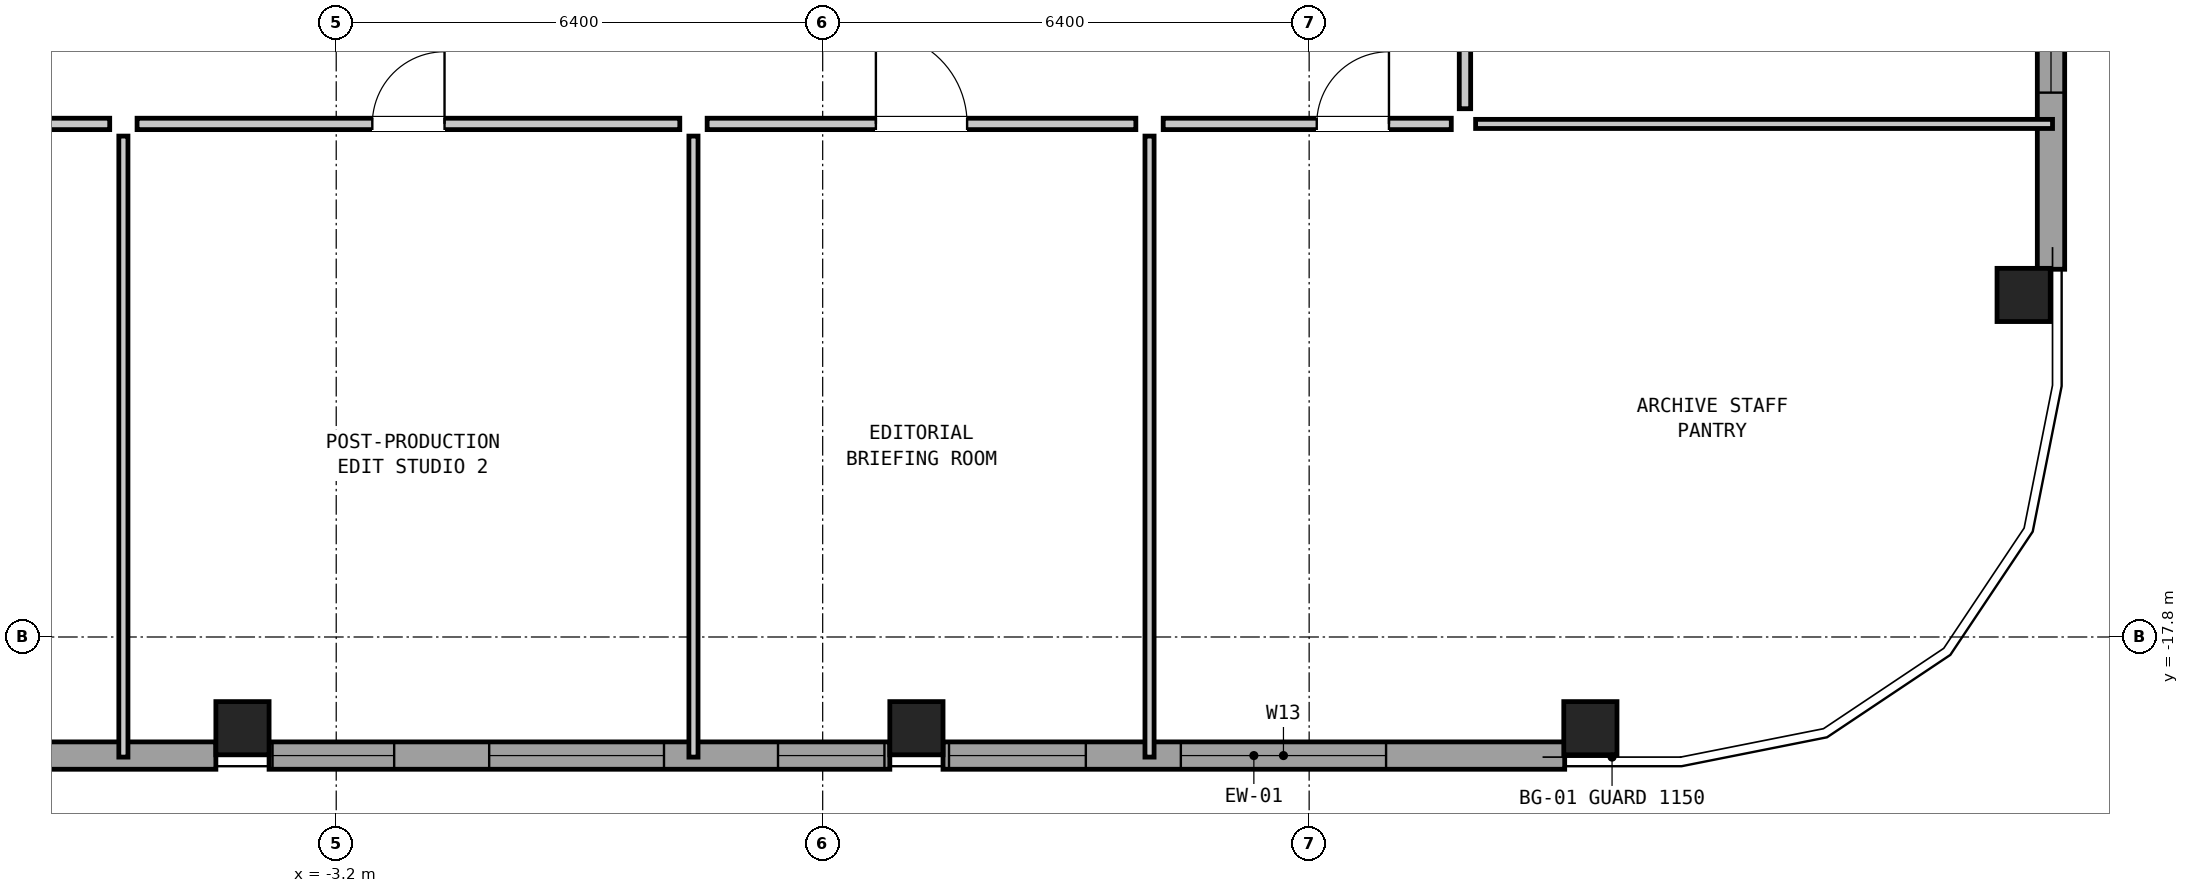
"""IFC4 building model, lengths in metres.
Left out: names, types, materials, properties, quantities, classifications, styles, units other than length and angle.
Written with IfcOpenShell. Run it as: python <this file> out.ifc"""

import sys

from ifc_helpers import new_model, si_unit, direction, frame, frame_2d, origin, origin_2d, place, context, subcontext, project, spatial, rectangle, hollow_rectangle, extrude, element, fill, save


model = new_model("IFC4")
c1 = context("Model", 3, precision=1e-05, world=origin(), true_north=direction((0.0, 1.0)))
c2 = subcontext(c1, "Body", "Model", "MODEL_VIEW")
j1 = project(units=[si_unit("LENGTHUNIT", "METRE"), si_unit("PLANEANGLEUNIT", "RADIAN")], contexts=[c1])
p1 = place(None, origin())
s1 = spatial("IfcSite", under=j1, at=p1, CompositionType="ELEMENT")
p2 = place(p1, origin())
s2 = spatial("IfcBuilding", under=s1, at=p2, CompositionType="ELEMENT")
p3 = place(p2, frame((0.0, 0.0, 220.85)))
s3 = spatial("IfcBuildingStorey", under=s2, at=p3, CompositionType="ELEMENT", Elevation=220.85)
for number, where, z_axis, x_axis in (
    (1, (-4.433, -19.0, 0.0), (0.0, 0.0, 1.0), (1.0, 0.0, 0.0)),
    (2, (4.433, -19.0, 0.0), (0.0, 0.0, 1.0), (1.0, 0.0, 0.0)),
    (3, (13.3, -19.0, 0.0), (0.0, 0.0, 1.0), (1.0, 0.0, 0.0)),
    (4, (19.0, -13.3, 0.0), (0.0, 0.0, 1.0), (0.0, 1.0, 0.0)),
):
    element("IfcColumn", number, at=place(p3, frame(where, z_axis=z_axis, x_axis=x_axis)), inside=s3, PredefinedType="COLUMN", context=c2, shape_type="SweptSolid", body=[
        extrude(hollow_rectangle(XDim=0.7, YDim=0.7, WallThickness=0.045, at=origin_2d()), origin(), (0.0, 0.0, 1.0), 3.05),
    ])
p4 = place(p3, frame((12.962, -19.36, 0.0), z_axis=(0.0, 0.0, 1.0), x_axis=(-1.0, 0.0, 0.0)))
e5 = element("IfcWall", 5, at=p4, inside=s3, PredefinedType="SOLIDWALL", context=c2, shape_type="SweptSolid", body=[
    extrude(rectangle(XDim=8.179, YDim=0.36, at=frame_2d((4.089, 0.0))), origin(), (0.0, 0.0, 1.0), 2.374),
])
p5 = place(p4, frame((2.35, 0.0, 0.2)))
e6 = element("IfcOpeningElement", 6, at=p5, cuts=e5, PredefinedType="OPENING", context=c2, shape_type="SweptSolid", body=[
    extrude(rectangle(XDim=2.7, YDim=1.1, at=frame_2d((1.35, 0.55))), frame((0.0, 0.192, 0.0), z_axis=(0.0, -1.0, 0.0), x_axis=(1.0, 0.0, 0.0)), (0.0, 0.0, 1.0), 0.384),
])
p6 = place(p4, frame((6.3, 0.0, 1.25)))
e7 = element("IfcOpeningElement", 7, at=p6, cuts=e5, PredefinedType="OPENING", context=c2, shape_type="SweptSolid", body=[
    extrude(rectangle(XDim=1.8, YDim=0.95, at=frame_2d((0.9, 0.475))), frame((0.0, 0.192, 0.0), z_axis=(0.0, -1.0, 0.0), x_axis=(1.0, 0.0, 0.0)), (0.0, 0.0, 1.0), 0.384),
])
p7 = place(p3, frame((4.083, -19.36, 0.0), z_axis=(0.0, 0.0, 1.0), x_axis=(-1.0, 0.0, 0.0)))
e8 = element("IfcWall", 8, at=p7, inside=s3, PredefinedType="SOLIDWALL", context=c2, shape_type="SweptSolid", body=[
    extrude(rectangle(XDim=8.167, YDim=0.36, at=frame_2d((4.083, 0.0))), origin(), (0.0, 0.0, 1.0), 2.374),
])
p8 = place(p7, frame((0.071, 0.0, 1.25)))
e9 = element("IfcOpeningElement", 9, at=p8, cuts=e8, PredefinedType="OPENING", context=c2, shape_type="SweptSolid", body=[
    extrude(rectangle(XDim=1.4, YDim=0.95, at=frame_2d((0.7, 0.475))), frame((0.0, 0.192, 0.0), z_axis=(0.0, -1.0, 0.0), x_axis=(1.0, 0.0, 0.0)), (0.0, 0.0, 1.0), 0.384),
])
p9 = place(p7, frame((2.971, 0.0, 0.2)))
e10 = element("IfcOpeningElement", 10, at=p9, cuts=e8, PredefinedType="OPENING", context=c2, shape_type="SweptSolid", body=[
    extrude(rectangle(XDim=2.3, YDim=1.2, at=frame_2d((1.15, 0.6))), frame((0.0, 0.192, 0.0), z_axis=(0.0, -1.0, 0.0), x_axis=(1.0, 0.0, 0.0)), (0.0, 0.0, 1.0), 0.384),
])
p10 = place(p7, frame((6.521, 0.0, 1.35)))
e11 = element("IfcOpeningElement", 11, at=p10, cuts=e8, PredefinedType="OPENING", context=c2, shape_type="SweptSolid", body=[
    extrude(rectangle(XDim=1.6, YDim=0.85, at=frame_2d((0.8, 0.425))), frame((0.0, 0.192, 0.0), z_axis=(0.0, -1.0, 0.0), x_axis=(1.0, 0.0, 0.0)), (0.0, 0.0, 1.0), 0.384),
])
p11 = place(p3, frame((-4.783, -19.36, 0.0), z_axis=(0.0, 0.0, 1.0), x_axis=(-1.0, 0.0, 0.0)))
e12 = element("IfcWall", 12, at=p11, inside=s3, PredefinedType="SOLIDWALL", context=c2, shape_type="SweptSolid", body=[
    extrude(rectangle(XDim=8.179, YDim=0.36, at=frame_2d((4.089, 0.0))), origin(), (0.0, 0.0, 1.0), 2.374),
])
p12 = place(p11, frame((2.805, 0.0, 0.2)))
e13 = element("IfcOpeningElement", 13, at=p12, cuts=e12, PredefinedType="OPENING", context=c2, shape_type="SweptSolid", body=[
    extrude(rectangle(XDim=3.35, YDim=0.9, at=frame_2d((1.675, 0.45))), frame((0.0, 0.192, 0.0), z_axis=(0.0, -1.0, 0.0), x_axis=(1.0, 0.0, 0.0)), (0.0, 0.0, 1.0), 0.384),
])
p13 = place(p3, frame((19.36, -4.783, 0.0), z_axis=(0.0, 0.0, 1.0), x_axis=(0.0, -1.0, 0.0)))
e14 = element("IfcWall", 14, at=p13, inside=s3, PredefinedType="SOLIDWALL", context=c2, shape_type="SweptSolid", body=[
    extrude(rectangle(XDim=8.179, YDim=0.36, at=frame_2d((4.089, 0.0))), origin(), (0.0, 0.0, 1.0), 2.374),
])
p14 = place(p13, frame((0.055, 0.0, 1.1)))
e15 = element("IfcOpeningElement", 15, at=p14, cuts=e14, PredefinedType="OPENING", context=c2, shape_type="SweptSolid", body=[
    extrude(rectangle(XDim=1.75, YDim=1.1, at=frame_2d((0.875, 0.55))), frame((0.0, 0.192, 0.0), z_axis=(0.0, -1.0, 0.0), x_axis=(1.0, 0.0, 0.0)), (0.0, 0.0, 1.0), 0.384),
])
p15 = place(p13, frame((3.055, 0.0, 0.2)))
e16 = element("IfcOpeningElement", 16, at=p15, cuts=e14, PredefinedType="OPENING", context=c2, shape_type="SweptSolid", body=[
    extrude(rectangle(XDim=2.8, YDim=1.15, at=frame_2d((1.4, 0.575))), frame((0.0, 0.192, 0.0), z_axis=(0.0, -1.0, 0.0), x_axis=(1.0, 0.0, 0.0)), (0.0, 0.0, 1.0), 0.384),
])
p16 = place(p3, frame((11.79, -11.05, 0.0), z_axis=(0.0, 0.0, 1.0), x_axis=(1.0, 0.0, 0.0)))
e17 = element("IfcWall", 17, at=p16, inside=s3, PredefinedType="PARTITIONING", context=c2, shape_type="SweptSolid", body=[
    extrude(rectangle(XDim=7.59, YDim=0.12, at=frame_2d((3.795, 0.0))), origin(), (0.0, 0.0, 1.0), 2.86),
])
p17 = place(p3, frame((-6.0, -19.38, 0.0), z_axis=(0.0, 0.0, 1.0), x_axis=(0.0, 1.0, 0.0)))
e18 = element("IfcWall", 18, at=p17, inside=s3, PredefinedType="PARTITIONING", context=c2, shape_type="SweptSolid", body=[
    extrude(rectangle(XDim=8.17, YDim=0.12, at=frame_2d((4.085, 0.0))), origin(), (0.0, 0.0, 1.0), 2.381),
])
for number, where, z_axis, x_axis in (
    (19, (1.5, -19.38, 0.0), (0.0, 0.0, 1.0), (0.0, 1.0, 0.0)),
    (20, (7.5, -19.38, 0.0), (0.0, 0.0, 1.0), (0.0, 1.0, 0.0)),
):
    element("IfcWall", number, at=place(p3, frame(where, z_axis=z_axis, x_axis=x_axis)), inside=s3, PredefinedType="PARTITIONING", context=c2, shape_type="SweptSolid", body=[
        extrude(rectangle(XDim=8.17, YDim=0.12, at=frame_2d((4.085, 0.0))), origin(), (0.0, 0.0, 1.0), 2.86),
    ])
p18 = place(p3, frame((-11.12, -11.05, 0.0), z_axis=(0.0, 0.0, 1.0), x_axis=(1.0, 0.0, 0.0)))
e21 = element("IfcWall", 21, at=p18, inside=s3, PredefinedType="PARTITIONING", context=c2, shape_type="SweptSolid", body=[
    extrude(rectangle(XDim=4.94, YDim=0.15, at=frame_2d((2.47, 0.0))), origin(), (0.0, 0.0, 1.0), 2.86),
])
p19 = place(p18, frame((2.195, 0.0, 0.0)))
e22 = element("IfcOpeningElement", 22, at=p19, cuts=e21, PredefinedType="OPENING", context=c2, shape_type="SweptSolid", body=[
    extrude(rectangle(XDim=0.95, YDim=2.1, at=frame_2d((0.475, 1.05))), frame((0.0, 0.087, 0.0), z_axis=(0.0, -1.0, 0.0), x_axis=(1.0, 0.0, 0.0)), (0.0, 0.0, 1.0), 0.174),
])
p20 = place(p3, frame((-5.82, -11.05, 0.0), z_axis=(0.0, 0.0, 1.0), x_axis=(1.0, 0.0, 0.0)))
e23 = element("IfcWall", 23, at=p20, inside=s3, PredefinedType="PARTITIONING", context=c2, shape_type="SweptSolid", body=[
    extrude(rectangle(XDim=7.14, YDim=0.15, at=frame_2d((3.57, 0.0))), origin(), (0.0, 0.0, 1.0), 2.86),
])
p21 = place(p20, frame((3.095, 0.0, 0.0)))
e24 = element("IfcOpeningElement", 24, at=p21, cuts=e23, PredefinedType="OPENING", context=c2, shape_type="SweptSolid", body=[
    extrude(rectangle(XDim=0.95, YDim=2.1, at=frame_2d((0.475, 1.05))), frame((0.0, 0.087, 0.0), z_axis=(0.0, -1.0, 0.0), x_axis=(1.0, 0.0, 0.0)), (0.0, 0.0, 1.0), 0.174),
])
p22 = place(p3, frame((1.68, -11.05, 0.0), z_axis=(0.0, 0.0, 1.0), x_axis=(1.0, 0.0, 0.0)))
e25 = element("IfcWall", 25, at=p22, inside=s3, PredefinedType="PARTITIONING", context=c2, shape_type="SweptSolid", body=[
    extrude(rectangle(XDim=5.64, YDim=0.15, at=frame_2d((2.82, 0.0))), origin(), (0.0, 0.0, 1.0), 2.86),
])
p23 = place(p22, frame((2.22, 0.0, 0.0)))
e26 = element("IfcOpeningElement", 26, at=p23, cuts=e25, PredefinedType="OPENING", context=c2, shape_type="SweptSolid", body=[
    extrude(rectangle(XDim=1.2, YDim=2.1, at=frame_2d((0.6, 1.05))), frame((0.0, 0.087, 0.0), z_axis=(0.0, -1.0, 0.0), x_axis=(1.0, 0.0, 0.0)), (0.0, 0.0, 1.0), 0.174),
])
p24 = place(p3, frame((7.68, -11.05, 0.0), z_axis=(0.0, 0.0, 1.0), x_axis=(1.0, 0.0, 0.0)))
e27 = element("IfcWall", 27, at=p24, inside=s3, PredefinedType="PARTITIONING", context=c2, shape_type="SweptSolid", body=[
    extrude(rectangle(XDim=3.79, YDim=0.15, at=frame_2d((1.895, 0.0))), origin(), (0.0, 0.0, 1.0), 2.86),
])
p25 = place(p24, frame((2.02, 0.0, 0.0)))
e28 = element("IfcOpeningElement", 28, at=p25, cuts=e27, PredefinedType="OPENING", context=c2, shape_type="SweptSolid", body=[
    extrude(rectangle(XDim=0.95, YDim=2.1, at=frame_2d((0.475, 1.05))), frame((0.0, 0.087, 0.0), z_axis=(0.0, -1.0, 0.0), x_axis=(1.0, 0.0, 0.0)), (0.0, 0.0, 1.0), 0.174),
])
p26 = place(p3, frame((11.65, -10.85, 0.0), z_axis=(0.0, 0.0, 1.0), x_axis=(0.0, 1.0, 0.0)))
e29 = element("IfcWall", 29, at=p26, inside=s3, PredefinedType="PARTITIONING", context=c2, shape_type="SweptSolid", body=[
    extrude(rectangle(XDim=8.29, YDim=0.15, at=frame_2d((4.145, 0.0))), origin(), (0.0, 0.0, 1.0), 2.86),
])
p27 = place(p26, frame((3.67, 0.0, 0.0)))
e30 = element("IfcOpeningElement", 30, at=p27, cuts=e29, PredefinedType="OPENING", context=c2, shape_type="SweptSolid", body=[
    extrude(rectangle(XDim=0.95, YDim=2.1, at=frame_2d((0.475, 1.05))), frame((0.0, 0.087, 0.0), z_axis=(0.0, -1.0, 0.0), x_axis=(1.0, 0.0, 0.0)), (0.0, 0.0, 1.0), 0.174),
])
p28 = place(p5, origin())
e31 = element("IfcWindow", 31, at=p28, inside=s3, PartitioningType="SINGLE_PANEL", PredefinedType="WINDOW", context=c2, shape_type="SweptSolid", body=[
    extrude(rectangle(XDim=2.7, YDim=1.1, at=frame_2d((1.35, 0.55))), frame((0.0, 0.03, 0.0), z_axis=(0.0, -1.0, 0.0), x_axis=(1.0, 0.0, 0.0)), (0.0, 0.0, 1.0), 0.06),
])
fill(e6, e31)
p29 = place(p6, origin())
e32 = element("IfcWindow", 32, at=p29, inside=s3, PartitioningType="SINGLE_PANEL", PredefinedType="WINDOW", context=c2, shape_type="SweptSolid", body=[
    extrude(rectangle(XDim=1.8, YDim=0.95, at=frame_2d((0.9, 0.475))), frame((0.0, 0.03, 0.0), z_axis=(0.0, -1.0, 0.0), x_axis=(1.0, 0.0, 0.0)), (0.0, 0.0, 1.0), 0.06),
])
fill(e7, e32)
p30 = place(p8, origin())
e33 = element("IfcWindow", 33, at=p30, inside=s3, PartitioningType="SINGLE_PANEL", PredefinedType="WINDOW", context=c2, shape_type="SweptSolid", body=[
    extrude(rectangle(XDim=1.4, YDim=0.95, at=frame_2d((0.7, 0.475))), frame((0.0, 0.03, 0.0), z_axis=(0.0, -1.0, 0.0), x_axis=(1.0, 0.0, 0.0)), (0.0, 0.0, 1.0), 0.06),
])
fill(e9, e33)
p31 = place(p9, origin())
e34 = element("IfcWindow", 34, at=p31, inside=s3, PartitioningType="SINGLE_PANEL", PredefinedType="WINDOW", context=c2, shape_type="SweptSolid", body=[
    extrude(rectangle(XDim=2.3, YDim=1.2, at=frame_2d((1.15, 0.6))), frame((0.0, 0.03, 0.0), z_axis=(0.0, -1.0, 0.0), x_axis=(1.0, 0.0, 0.0)), (0.0, 0.0, 1.0), 0.06),
])
fill(e10, e34)
p32 = place(p10, origin())
e35 = element("IfcWindow", 35, at=p32, inside=s3, PartitioningType="SINGLE_PANEL", PredefinedType="WINDOW", context=c2, shape_type="SweptSolid", body=[
    extrude(rectangle(XDim=1.6, YDim=0.85, at=frame_2d((0.8, 0.425))), frame((0.0, 0.03, 0.0), z_axis=(0.0, -1.0, 0.0), x_axis=(1.0, 0.0, 0.0)), (0.0, 0.0, 1.0), 0.06),
])
fill(e11, e35)
p33 = place(p15, origin())
e36 = element("IfcWindow", 36, at=p33, inside=s3, PartitioningType="SINGLE_PANEL", PredefinedType="WINDOW", context=c2, shape_type="SweptSolid", body=[
    extrude(rectangle(XDim=2.8, YDim=1.15, at=frame_2d((1.4, 0.575))), frame((0.0, 0.03, 0.0), z_axis=(0.0, -1.0, 0.0), x_axis=(1.0, 0.0, 0.0)), (0.0, 0.0, 1.0), 0.06),
])
fill(e16, e36)
p34 = place(p21, origin())
e37 = element("IfcDoor", 37, at=p34, inside=s3, OperationType="SINGLE_SWING_RIGHT", PredefinedType="DOOR", context=c2, shape_type="SweptSolid", body=[
    extrude(rectangle(XDim=0.95, YDim=2.1, at=frame_2d((0.475, 1.05))), frame((0.0, 0.025, 0.0), z_axis=(0.0, -1.0, 0.0), x_axis=(1.0, 0.0, 0.0)), (0.0, 0.0, 1.0), 0.05),
])
fill(e24, e37)
p35 = place(p23, origin())
e38 = element("IfcDoor", 38, at=p35, inside=s3, OperationType="SINGLE_SWING_LEFT", PredefinedType="DOOR", context=c2, shape_type="SweptSolid", body=[
    extrude(rectangle(XDim=1.2, YDim=2.1, at=frame_2d((0.6, 1.05))), frame((0.0, 0.025, 0.0), z_axis=(0.0, -1.0, 0.0), x_axis=(1.0, 0.0, 0.0)), (0.0, 0.0, 1.0), 0.05),
])
fill(e26, e38)
p36 = place(p25, origin())
e39 = element("IfcDoor", 39, at=p36, inside=s3, OperationType="SINGLE_SWING_RIGHT", PredefinedType="DOOR", context=c2, shape_type="SweptSolid", body=[
    extrude(rectangle(XDim=0.95, YDim=2.1, at=frame_2d((0.475, 1.05))), frame((0.0, 0.025, 0.0), z_axis=(0.0, -1.0, 0.0), x_axis=(1.0, 0.0, 0.0)), (0.0, 0.0, 1.0), 0.05),
])
fill(e28, e39)
save(model, sys.argv[1])
